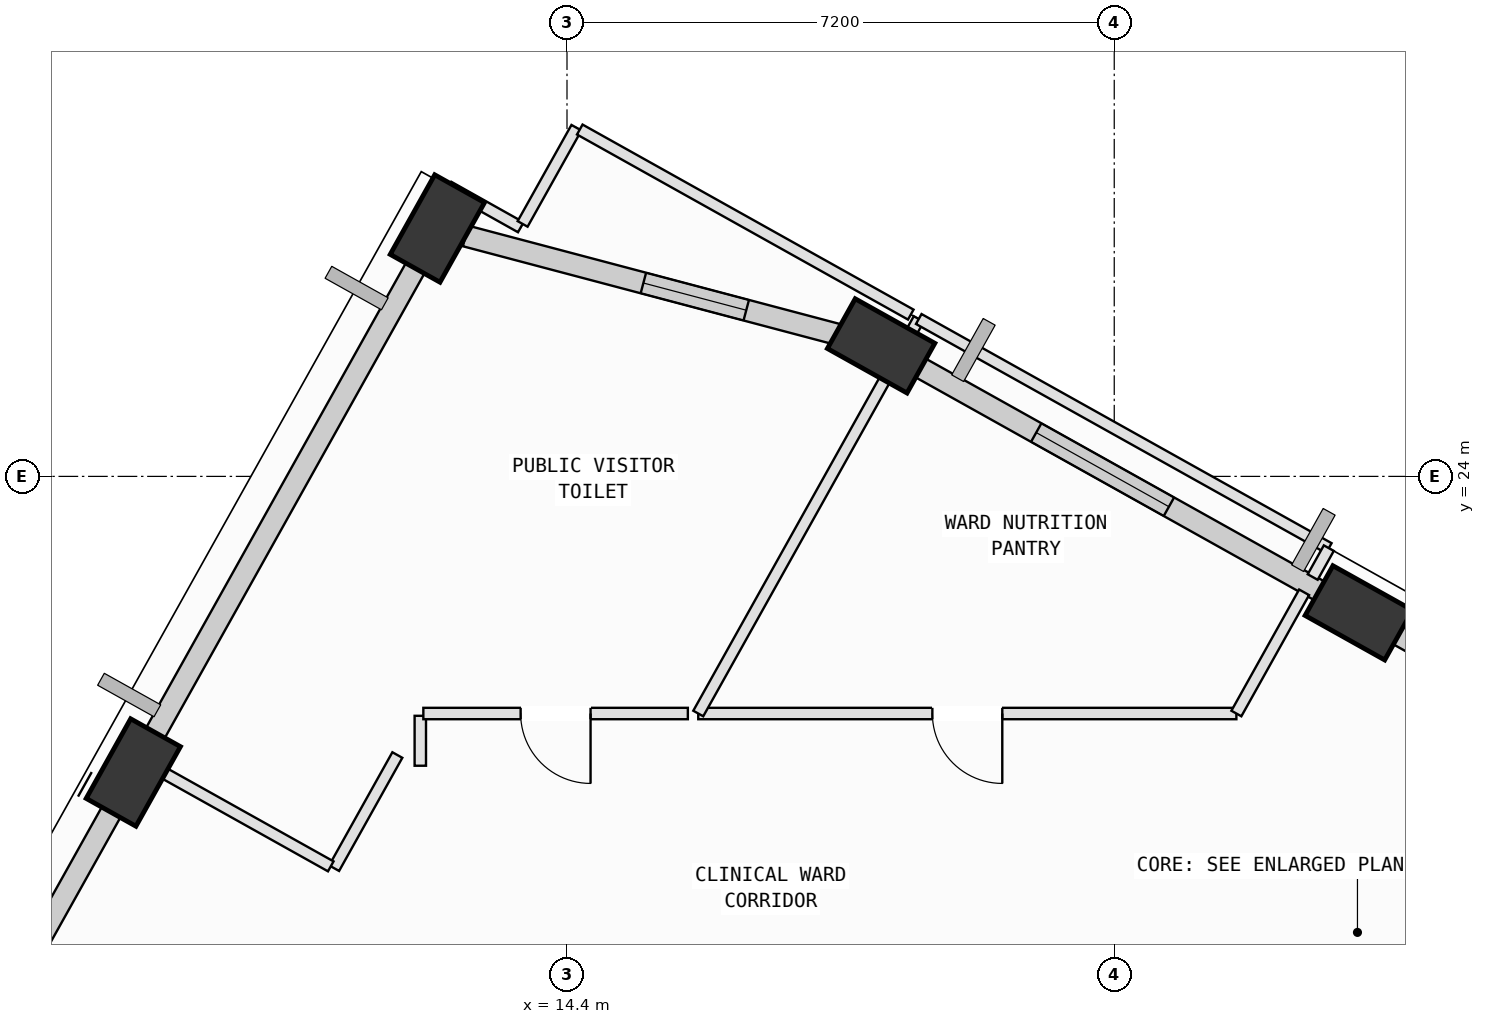
"""IFC4 building model, lengths in metres.
Left out: names, types, materials, properties, quantities, classifications, styles, units other than length and angle.
Written with IfcOpenShell. Run it as: python <this file> out.ifc"""

import sys

from ifc_helpers import new_model, si_unit, direction, frame, frame_2d, origin, origin_2d, place, context, subcontext, project, spatial, rectangle, extrude, element, fill, save


model = new_model("IFC4")
c1 = context("Model", 3, precision=1e-05, world=origin(), true_north=direction((0.0, 1.0)))
c2 = subcontext(c1, "Body", "Model", "MODEL_VIEW")
j1 = project(units=[si_unit("LENGTHUNIT", "METRE"), si_unit("PLANEANGLEUNIT", "RADIAN")], contexts=[c1])
p1 = place(None, origin())
s1 = spatial("IfcSite", under=j1, at=p1, CompositionType="ELEMENT")
p2 = place(p1, origin())
s2 = spatial("IfcBuilding", under=s1, at=p2, CompositionType="ELEMENT")
p3 = place(p2, frame((0.0, 0.0, 284.6)))
s3 = spatial("IfcBuildingStorey", under=s2, at=p3, CompositionType="ELEMENT", Elevation=284.6)
p4 = place(p3, frame((24.818, 22.205, 0.002), z_axis=(0.011049538905, -0.036262022705, 0.999281228383), x_axis=(-0.97711668251, 0.211898481127, 0.018493849186)))
e1 = element("IfcColumn", 1, at=p4, inside=s3, PredefinedType="COLUMN", context=c2, shape_type="SweptSolid", body=[
    extrude(rectangle(XDim=1.2, YDim=0.75, at=origin_2d()), origin(), (0.0, 0.0, 1.0), 3.999),
])
p5 = place(p3, frame((18.533, 25.717, 0.002), z_axis=(-0.003292489755, -0.062313417207, 0.998051199863), x_axis=(-0.84601485866, 0.532289495015, 0.030442608683)))
e2 = element("IfcColumn", 2, at=p5, inside=s3, PredefinedType="COLUMN", context=c2, shape_type="SweptSolid", body=[
    extrude(rectangle(XDim=1.2, YDim=0.75, at=origin_2d()), origin(), (0.0, 0.0, 1.0), 4.004),
])
p6 = place(p3, frame((12.694, 27.262, 0.002), z_axis=(-0.009433268873, -0.086420914834, 0.996214052761), x_axis=(0.579341518792, 0.811544574449, 0.075886812336)))
e3 = element("IfcColumn", 3, at=p6, inside=s3, PredefinedType="COLUMN", context=c2, shape_type="SweptSolid", body=[
    extrude(rectangle(XDim=1.2, YDim=0.75, at=origin_2d()), origin(), (0.0, 0.0, 1.0), 4.011),
])
p7 = place(p3, frame((8.694, 20.104, 0.002), z_axis=(0.020171272546, -0.102496797545, 0.994528796092), x_axis=(0.311043208592, 0.946011043433, 0.091187872504)))
e4 = element("IfcColumn", 4, at=p7, inside=s3, PredefinedType="COLUMN", context=c2, shape_type="SweptSolid", body=[
    extrude(rectangle(XDim=1.2, YDim=0.75, at=origin_2d()), origin(), (0.0, 0.0, 1.0), 4.018),
])
p8 = place(p3, frame((25.21, 21.986, 0.0), z_axis=(0.0, 0.0, 1.0), x_axis=(0.872934692493, -0.48783708617, 0.0)))
e5 = element("IfcWall", 5, at=p8, inside=s3, PredefinedType="SOLIDWALL", context=c2, shape_type="SweptSolid", body=[
    extrude(rectangle(XDim=6.958, YDim=0.28, at=frame_2d((3.479, 0.0))), origin(), (0.0, 0.0, 1.0), 3.165),
])
p9 = place(p3, frame((18.914, 25.504, 0.0), z_axis=(0.0, 0.0, 1.0), x_axis=(0.872904924661, -0.487890348852, 0.0)))
e6 = element("IfcWall", 6, at=p9, inside=s3, PredefinedType="SOLIDWALL", context=c2, shape_type="SweptSolid", body=[
    extrude(rectangle(XDim=6.424, YDim=0.28, at=frame_2d((3.212, 0.0))), origin(), (0.0, 0.0, 1.0), 3.265),
])
p10 = place(p9, frame((1.901, 0.0, 0.75)))
e7 = element("IfcOpeningElement", 7, at=p10, cuts=e6, PredefinedType="OPENING", context=c2, shape_type="SweptSolid", body=[
    extrude(rectangle(XDim=2.0, YDim=1.95, at=frame_2d((1.0, 0.975))), frame((0.0, 0.15, 0.0), z_axis=(0.0, -1.0, 0.0), x_axis=(1.0, 0.0, 0.0)), (0.0, 0.0, 1.0), 0.3),
])
p11 = place(p3, frame((13.066, 27.164, 0.0), z_axis=(0.0, 0.0, 1.0), x_axis=(0.966736710516, -0.255773596253, 0.0)))
e8 = element("IfcWall", 8, at=p11, inside=s3, PredefinedType="SOLIDWALL", context=c2, shape_type="SweptSolid", body=[
    extrude(rectangle(XDim=5.302, YDim=0.28, at=frame_2d((2.651, 0.0))), origin(), (0.0, 0.0, 1.0), 3.265),
])
p12 = place(p11, frame((2.42, 0.0, 0.75)))
e9 = element("IfcOpeningElement", 9, at=p12, cuts=e8, PredefinedType="OPENING", context=c2, shape_type="SweptSolid", body=[
    extrude(rectangle(XDim=1.4, YDim=1.85, at=frame_2d((0.7, 0.925))), frame((0.0, 0.15, 0.0), z_axis=(0.0, -1.0, 0.0), x_axis=(1.0, 0.0, 0.0)), (0.0, 0.0, 1.0), 0.3),
])
p13 = place(p3, frame((8.798, 20.29, 0.0), z_axis=(0.0, 0.0, 1.0), x_axis=(0.487844174759, 0.872930731017, 0.0)))
e10 = element("IfcWall", 10, at=p13, inside=s3, PredefinedType="SOLIDWALL", context=c2, shape_type="SweptSolid", body=[
    extrude(rectangle(XDim=7.434, YDim=0.28, at=frame_2d((3.717, 0.0))), origin(), (0.0, 0.0, 1.0), 3.265),
])
p14 = place(p3, frame((4.782, 13.104, 0.0), z_axis=(0.0, 0.0, 1.0), x_axis=(0.487879111407, 0.87291120548, 0.0)))
e11 = element("IfcWall", 11, at=p14, inside=s3, PredefinedType="SOLIDWALL", context=c2, shape_type="SweptSolid", body=[
    extrude(rectangle(XDim=7.485, YDim=0.28, at=frame_2d((3.742, 0.0))), origin(), (0.0, 0.0, 1.0), 3.265),
])
p15 = place(p3, frame((23.207, 20.88, 0.0), z_axis=(0.0, 0.0, 1.0), x_axis=(-1.0, 0.0, 0.0)))
e12 = element("IfcWall", 12, at=p15, inside=s3, PredefinedType="PARTITIONING", context=c2, shape_type="SweptSolid", body=[
    extrude(rectangle(XDim=7.08, YDim=0.15, at=frame_2d((3.54, 0.0))), origin(), (0.0, 0.0, 1.0), 3.415),
])
p16 = place(p15, frame((3.08, 0.0, 0.0)))
e13 = element("IfcOpeningElement", 13, at=p16, cuts=e12, PredefinedType="OPENING", context=c2, shape_type="SweptSolid", body=[
    extrude(rectangle(XDim=0.92, YDim=2.1, at=frame_2d((0.46, 1.05))), frame((0.0, 0.085, 0.0), z_axis=(0.0, -1.0, 0.0), x_axis=(1.0, 0.0, 0.0)), (0.0, 0.0, 1.0), 0.17),
])
p17 = place(p3, frame((16.127, 20.88, 0.0), z_axis=(0.0, 0.0, 1.0), x_axis=(0.48784436071, 0.872930627096, 0.0)))
e14 = element("IfcWall", 14, at=p17, inside=s3, PredefinedType="PARTITIONING", context=c2, shape_type="SweptSolid", body=[
    extrude(rectangle(XDim=5.947, YDim=0.15, at=frame_2d((2.973, 0.0))), origin(), (0.0, 0.0, 1.0), 3.78),
])
p18 = place(p3, frame((19.028, 26.071, 0.0), z_axis=(0.0, 0.0, 1.0), x_axis=(0.872924680728, -0.487855000769, 0.0)))
e15 = element("IfcWall", 15, at=p18, inside=s3, PredefinedType="PARTITIONING", context=c2, shape_type="SweptSolid", body=[
    extrude(rectangle(XDim=6.18, YDim=0.15, at=frame_2d((3.09, 0.0))), origin(), (0.0, 0.0, 1.0), 3.78),
])
p19 = place(p3, frame((24.423, 23.056, 0.0), z_axis=(0.0, 0.0, 1.0), x_axis=(-0.487594978343, -0.873069949715, 0.0)))
e16 = element("IfcWall", 16, at=p19, inside=s3, PredefinedType="PARTITIONING", context=c2, shape_type="SweptSolid", body=[
    extrude(rectangle(XDim=0.435, YDim=0.15, at=frame_2d((0.218, 0.0))), origin(), (0.0, 0.0, 1.0), 3.78),
])
p20 = place(p3, frame((24.098, 22.475, 0.0), z_axis=(0.0, 0.0, 1.0), x_axis=(-0.487581755791, -0.873077334157, 0.0)))
e17 = element("IfcWall", 17, at=p20, inside=s3, PredefinedType="PARTITIONING", context=c2, shape_type="SweptSolid", body=[
    extrude(rectangle(XDim=1.827, YDim=0.15, at=frame_2d((0.914, 0.0))), origin(), (0.0, 0.0, 1.0), 3.78),
])
p21 = place(p3, frame((12.47, 20.85, 0.0), z_axis=(0.0, 0.0, 1.0), x_axis=(0.0, -1.0, 0.0)))
e18 = element("IfcWall", 18, at=p21, inside=s3, PredefinedType="PARTITIONING", context=c2, shape_type="SweptSolid", body=[
    extrude(rectangle(XDim=0.657, YDim=0.15, at=frame_2d((0.329, 0.0))), origin(), (0.0, 0.0, 1.0), 3.78),
])
p22 = place(p3, frame((12.168, 20.334, 0.0), z_axis=(0.0, 0.0, 1.0), x_axis=(-0.487792485764, -0.872959615808, 0.0)))
e19 = element("IfcWall", 19, at=p22, inside=s3, PredefinedType="PARTITIONING", context=c2, shape_type="SweptSolid", body=[
    extrude(rectangle(XDim=1.706, YDim=0.15, at=frame_2d((0.853, 0.0))), origin(), (0.0, 0.0, 1.0), 3.78),
])
p23 = place(p3, frame((11.292, 18.869, 0.0), z_axis=(0.0, 0.0, 1.0), x_axis=(-0.87277157088, 0.488128861125, 0.0)))
e20 = element("IfcWall", 20, at=p23, inside=s3, PredefinedType="PARTITIONING", context=c2, shape_type="SweptSolid", body=[
    extrude(rectangle(XDim=2.758, YDim=0.15, at=frame_2d((1.379, 0.0))), origin(), (0.0, 0.0, 1.0), 3.78),
])
p24 = place(p3, frame((12.259, 26.872, 0.0), z_axis=(0.0, 0.0, 1.0), x_axis=(0.487821357665, 0.872943482137, 0.0)))
e21 = element("IfcWall", 21, at=p24, inside=s3, PredefinedType="PARTITIONING", context=c2, shape_type="SweptSolid", body=[
    extrude(rectangle(XDim=1.103, YDim=0.15, at=frame_2d((0.552, 0.0))), origin(), (0.0, 0.0, 1.0), 3.265),
])
p25 = place(p3, frame((12.841, 27.811, 0.0), z_axis=(0.0, 0.0, 1.0), x_axis=(0.872334102779, -0.488910230133, 0.0)))
e22 = element("IfcWall", 22, at=p25, inside=s3, PredefinedType="PARTITIONING", context=c2, shape_type="SweptSolid", body=[
    extrude(rectangle(XDim=1.09, YDim=0.15, at=frame_2d((0.545, 0.0))), origin(), (0.0, 0.0, 1.0), 3.78),
])
p26 = place(p3, frame((13.816, 27.322, 0.0), z_axis=(0.0, 0.0, 1.0), x_axis=(0.488141996305, 0.872764224429, 0.0)))
e23 = element("IfcWall", 23, at=p26, inside=s3, PredefinedType="PARTITIONING", context=c2, shape_type="SweptSolid", body=[
    extrude(rectangle(XDim=1.45, YDim=0.15, at=frame_2d((0.725, 0.0))), origin(), (0.0, 0.0, 1.0), 3.78),
])
p27 = place(p3, frame((14.568, 28.564, 0.0), z_axis=(0.0, 0.0, 1.0), x_axis=(0.872824564781, -0.488034096262, 0.0)))
e24 = element("IfcWall", 24, at=p27, inside=s3, PredefinedType="PARTITIONING", context=c2, shape_type="SweptSolid", body=[
    extrude(rectangle(XDim=4.99, YDim=0.15, at=frame_2d((2.495, 0.0))), origin(), (0.0, 0.0, 1.0), 3.78),
])
p28 = place(p3, frame((15.99, 20.88, 0.0), z_axis=(0.0, 0.0, 1.0), x_axis=(-1.0, 0.0, 0.0)))
e25 = element("IfcWall", 25, at=p28, inside=s3, PredefinedType="PARTITIONING", context=c2, shape_type="SweptSolid", body=[
    extrude(rectangle(XDim=3.48, YDim=0.15, at=frame_2d((1.74, 0.0))), origin(), (0.0, 0.0, 1.0), 3.415),
])
p29 = place(p28, frame((1.28, 0.0, 0.0)))
e26 = element("IfcOpeningElement", 26, at=p29, cuts=e25, PredefinedType="OPENING", context=c2, shape_type="SweptSolid", body=[
    extrude(rectangle(XDim=0.92, YDim=2.1, at=frame_2d((0.46, 1.05))), frame((0.0, 0.085, 0.0), z_axis=(0.0, -1.0, 0.0), x_axis=(1.0, 0.0, 0.0)), (0.0, 0.0, 1.0), 0.17),
])
p30 = place(p10, origin())
e27 = element("IfcWindow", 27, at=p30, inside=s3, PartitioningType="SINGLE_PANEL", PredefinedType="WINDOW", context=c2, shape_type="SweptSolid", body=[
    extrude(rectangle(XDim=2.0, YDim=1.95, at=frame_2d((1.0, 0.975))), frame((0.0, 0.03, 0.0), z_axis=(0.0, -1.0, 0.0), x_axis=(1.0, 0.0, 0.0)), (0.0, 0.0, 1.0), 0.06),
])
fill(e7, e27)
p31 = place(p12, origin())
e28 = element("IfcWindow", 28, at=p31, inside=s3, PartitioningType="SINGLE_PANEL", PredefinedType="WINDOW", context=c2, shape_type="SweptSolid", body=[
    extrude(rectangle(XDim=1.4, YDim=1.85, at=frame_2d((0.7, 0.925))), frame((0.0, 0.03, 0.0), z_axis=(0.0, -1.0, 0.0), x_axis=(1.0, 0.0, 0.0)), (0.0, 0.0, 1.0), 0.06),
])
fill(e9, e28)
p32 = place(p16, origin())
e29 = element("IfcDoor", 29, at=p32, inside=s3, OperationType="SINGLE_SWING_LEFT", PredefinedType="DOOR", context=c2, shape_type="SweptSolid", body=[
    extrude(rectangle(XDim=0.92, YDim=2.1, at=frame_2d((0.46, 1.05))), frame((0.0, 0.025, 0.0), z_axis=(0.0, -1.0, 0.0), x_axis=(1.0, 0.0, 0.0)), (0.0, 0.0, 1.0), 0.05),
])
fill(e13, e29)
p33 = place(p29, origin())
e30 = element("IfcDoor", 30, at=p33, inside=s3, OperationType="SINGLE_SWING_LEFT", PredefinedType="DOOR", context=c2, shape_type="SweptSolid", body=[
    extrude(rectangle(XDim=0.92, YDim=2.1, at=frame_2d((0.46, 1.05))), frame((0.0, 0.025, 0.0), z_axis=(0.0, -1.0, 0.0), x_axis=(1.0, 0.0, 0.0)), (0.0, 0.0, 1.0), 0.05),
])
fill(e26, e30)
save(model, sys.argv[1])
